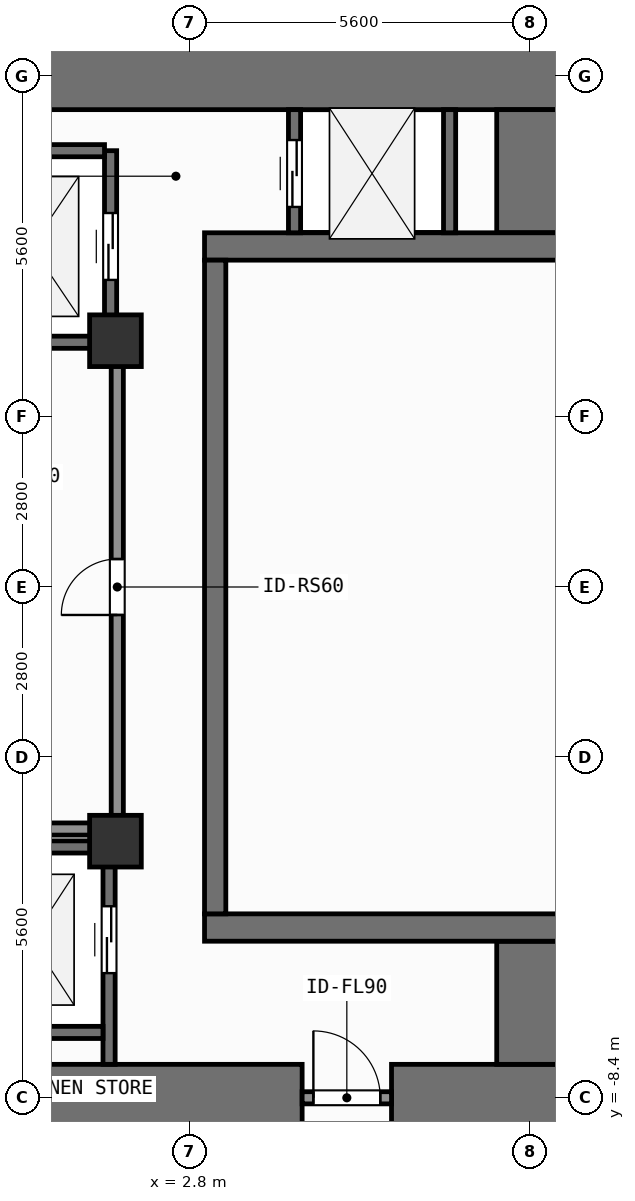
"""IFC4 building model, lengths in metres.
Left out: names, types, materials, properties, quantities, classifications, styles, units other than length and angle.
Written with IfcOpenShell. Run it as: python <this file> out.ifc"""

import sys

from ifc_helpers import new_model, si_unit, direction, frame, frame_2d, origin, origin_2d, place, context, subcontext, project, spatial, rectangle, extrude, element, fill, save


model = new_model("IFC4")
c1 = context("Model", 3, precision=1e-05, world=origin(), true_north=direction((0.0, 1.0)))
c2 = subcontext(c1, "Body", "Model", "MODEL_VIEW")
j1 = project(units=[si_unit("LENGTHUNIT", "METRE"), si_unit("PLANEANGLEUNIT", "RADIAN")], contexts=[c1])
p1 = place(None, origin())
s1 = spatial("IfcSite", under=j1, at=p1, CompositionType="ELEMENT")
p2 = place(p1, origin())
s2 = spatial("IfcBuilding", under=s1, at=p2, CompositionType="ELEMENT")
p3 = place(p2, frame((0.0, 0.0, 4.8)))
s3 = spatial("IfcBuildingStorey", under=s2, at=p3, CompositionType="ELEMENT", Elevation=4.8)
p4 = place(p3, frame((-2.62, -8.4, 0.0), z_axis=(0.0, 0.0, 1.0), x_axis=(1.0, 0.0, 0.0)))
e1 = element("IfcWall", 1, at=p4, inside=s3, PredefinedType="SHEAR", context=c2, shape_type="SweptSolid", body=[
    extrude(rectangle(XDim=7.27, YDim=1.1, at=frame_2d((3.635, 0.0))), origin(), (0.0, 0.0, 1.0), 4.2),
])
p5 = place(p3, frame((6.12, -8.4, 0.0), z_axis=(0.0, 0.0, 1.0), x_axis=(1.0, 0.0, 0.0)))
e2 = element("IfcWall", 2, at=p5, inside=s3, PredefinedType="SHEAR", context=c2, shape_type="SweptSolid", body=[
    extrude(rectangle(XDim=2.83, YDim=1.1, at=frame_2d((1.415, 0.0))), origin(), (0.0, 0.0, 1.0), 4.2),
])
p6 = place(p3, frame((-7.55, 8.4, 0.0), z_axis=(0.0, 0.0, 1.0), x_axis=(1.0, 0.0, 0.0)))
e3 = element("IfcWall", 3, at=p6, inside=s3, PredefinedType="SHEAR", context=c2, shape_type="SweptSolid", body=[
    extrude(rectangle(XDim=16.5, YDim=1.1, at=frame_2d((8.25, 0.0))), origin(), (0.0, 0.0, 1.0), 4.2),
])
for number, where, z_axis, x_axis in (
    (4, (8.4, -7.85, 0.0), (0.0, 0.0, 1.0), (0.0, 1.0, 0.0)),
    (5, (8.4, 5.825, 0.0), (0.0, 0.0, 1.0), (0.0, 1.0, 0.0)),
):
    element("IfcWall", number, at=place(p3, frame(where, z_axis=z_axis, x_axis=x_axis)), inside=s3, PredefinedType="SHEAR", context=c2, shape_type="SweptSolid", body=[
        extrude(rectangle(XDim=2.025, YDim=1.1, at=frame_2d((1.013, 0.0))), origin(), (0.0, 0.0, 1.0), 4.2),
    ])
for number, where, z_axis, x_axis in (
    (6, (3.045, -5.6, 0.0), (0.0, 0.0, 1.0), (1.0, 0.0, 0.0)),
    (7, (3.045, 5.6, 0.0), (0.0, 0.0, 1.0), (1.0, 0.0, 0.0)),
):
    element("IfcWall", number, at=place(p3, frame(where, z_axis=z_axis, x_axis=x_axis)), inside=s3, PredefinedType="SHEAR", context=c2, shape_type="SweptSolid", body=[
        extrude(rectangle(XDim=5.905, YDim=0.45, at=frame_2d((2.953, 0.0))), origin(), (0.0, 0.0, 1.0), 4.2),
    ])
p7 = place(p3, frame((3.22, -5.375, 0.0), z_axis=(0.0, 0.0, 1.0), x_axis=(0.0, 1.0, 0.0)))
e8 = element("IfcWall", 8, at=p7, inside=s3, PredefinedType="SHEAR", context=c2, shape_type="SweptSolid", body=[
    extrude(rectangle(XDim=10.75, YDim=0.35, at=frame_2d((5.375, 0.0))), origin(), (0.0, 0.0, 1.0), 4.2),
])
for number, where, z_axis, x_axis in (
    (9, (1.58, -4.18, 0.0), (0.0, 0.0, 1.0), (1.0, 0.0, 0.0)),
    (10, (1.58, 4.05, 0.0), (0.0, 0.0, 1.0), (1.0, 0.0, 0.0)),
):
    element("IfcColumn", number, at=place(p3, frame(where, z_axis=z_axis, x_axis=x_axis)), inside=s3, PredefinedType="COLUMN", context=c2, shape_type="SweptSolid", body=[
        extrude(rectangle(XDim=0.85, YDim=0.85, at=origin_2d()), origin(), (0.0, 0.0, 1.0), 4.2),
    ])
p8 = place(p3, frame((1.5, 4.025, 0.0), z_axis=(0.0, 0.0, 1.0), x_axis=(0.0, 1.0, 0.0)))
e11 = element("IfcWall", 11, at=p8, inside=s3, PredefinedType="SHEAR", context=c2, shape_type="SweptSolid", body=[
    extrude(rectangle(XDim=3.15, YDim=0.2, at=frame_2d((1.575, 0.0))), origin(), (0.0, 0.0, 1.0), 3.96),
])
p9 = place(p8, frame((1.025, 0.0, 0.0)))
e12 = element("IfcOpeningElement", 12, at=p9, cuts=e11, PredefinedType="OPENING", context=c2, shape_type="SweptSolid", body=[
    extrude(rectangle(XDim=1.1, YDim=2.2, at=frame_2d((0.55, 1.1))), frame((0.0, 0.11, 0.0), z_axis=(0.0, -1.0, 0.0), x_axis=(1.0, 0.0, 0.0)), (0.0, 0.0, 1.0), 0.22),
])
for number, where, z_axis, x_axis in (
    (13, (-1.0, 4.025, 0.0), (0.0, 0.0, 1.0), (1.0, 0.0, 0.0)),
    (14, (-1.0, 7.175, 0.0), (0.0, 0.0, 1.0), (1.0, 0.0, 0.0)),
):
    element("IfcWall", number, at=place(p3, frame(where, z_axis=z_axis, x_axis=x_axis)), inside=s3, PredefinedType="SHEAR", context=c2, shape_type="SweptSolid", body=[
        extrude(rectangle(XDim=2.4, YDim=0.2, at=frame_2d((1.2, 0.0))), origin(), (0.0, 0.0, 1.0), 3.96),
    ])
p10 = place(p3, frame((1.475, -7.85, 0.0), z_axis=(0.0, 0.0, 1.0), x_axis=(0.0, 1.0, 0.0)))
e15 = element("IfcWall", 15, at=p10, inside=s3, PredefinedType="SHEAR", context=c2, shape_type="SweptSolid", body=[
    extrude(rectangle(XDim=3.575, YDim=0.2, at=frame_2d((1.788, 0.0))), origin(), (0.0, 0.0, 1.0), 3.96),
])
p11 = place(p10, frame((1.5, 0.0, 0.0)))
e16 = element("IfcOpeningElement", 16, at=p11, cuts=e15, PredefinedType="OPENING", context=c2, shape_type="SweptSolid", body=[
    extrude(rectangle(XDim=1.1, YDim=2.2, at=frame_2d((0.55, 1.1))), frame((0.0, 0.11, 0.0), z_axis=(0.0, -1.0, 0.0), x_axis=(1.0, 0.0, 0.0)), (0.0, 0.0, 1.0), 0.22),
])
for number, where, z_axis, x_axis in (
    (17, (-0.975, -7.325, 0.0), (0.0, 0.0, 1.0), (1.0, 0.0, 0.0)),
    (18, (-0.975, -4.275, 0.0), (0.0, 0.0, 1.0), (1.0, 0.0, 0.0)),
):
    element("IfcWall", number, at=place(p3, frame(where, z_axis=z_axis, x_axis=x_axis)), inside=s3, PredefinedType="SHEAR", context=c2, shape_type="SweptSolid", body=[
        extrude(rectangle(XDim=2.35, YDim=0.2, at=frame_2d((1.175, 0.0))), origin(), (0.0, 0.0, 1.0), 3.96),
    ])
p12 = place(p3, frame((4.525, 5.825, 0.0), z_axis=(0.0, 0.0, 1.0), x_axis=(0.0, 1.0, 0.0)))
e19 = element("IfcWall", 19, at=p12, inside=s3, PredefinedType="SHEAR", context=c2, shape_type="SweptSolid", body=[
    extrude(rectangle(XDim=2.025, YDim=0.2, at=frame_2d((1.013, 0.0))), origin(), (0.0, 0.0, 1.0), 3.96),
])
p13 = place(p12, frame((0.425, 0.0, 0.0)))
e20 = element("IfcOpeningElement", 20, at=p13, cuts=e19, PredefinedType="OPENING", context=c2, shape_type="SweptSolid", body=[
    extrude(rectangle(XDim=1.1, YDim=2.2, at=frame_2d((0.55, 1.1))), frame((0.0, 0.11, 0.0), z_axis=(0.0, -1.0, 0.0), x_axis=(1.0, 0.0, 0.0)), (0.0, 0.0, 1.0), 0.22),
])
p14 = place(p3, frame((7.075, 5.825, 0.0), z_axis=(0.0, 0.0, 1.0), x_axis=(0.0, 1.0, 0.0)))
e21 = element("IfcWall", 21, at=p14, inside=s3, PredefinedType="SHEAR", context=c2, shape_type="SweptSolid", body=[
    extrude(rectangle(XDim=2.025, YDim=0.2, at=frame_2d((1.013, 0.0))), origin(), (0.0, 0.0, 1.0), 3.96),
])
p15 = place(p3, frame((4.65, -8.4, 0.0), z_axis=(0.0, 0.0, 1.0), x_axis=(1.0, 0.0, 0.0)))
e22 = element("IfcWall", 22, at=p15, inside=s3, PredefinedType="SOLIDWALL", context=c2, shape_type="SweptSolid", body=[
    extrude(rectangle(XDim=1.47, YDim=0.2, at=frame_2d((0.735, 0.0))), origin(), (0.0, 0.0, 1.0), 3.0),
])
p16 = place(p15, frame((0.185, 0.0, 0.0)))
e23 = element("IfcOpeningElement", 23, at=p16, cuts=e22, PredefinedType="OPENING", context=c2, shape_type="SweptSolid", body=[
    extrude(rectangle(XDim=1.1, YDim=2.15, at=frame_2d((0.55, 1.075))), frame((0.0, 0.11, 0.0), z_axis=(0.0, -1.0, 0.0), x_axis=(1.0, 0.0, 0.0)), (0.0, 0.0, 1.0), 0.22),
])
p17 = place(p3, frame((1.61, -3.98, 0.0), z_axis=(0.0, 0.0, 1.0), x_axis=(0.0, 1.0, 0.0)))
e24 = element("IfcWall", 24, at=p17, inside=s3, PredefinedType="SOLIDWALL", context=c2, shape_type="SweptSolid", body=[
    extrude(rectangle(XDim=7.96, YDim=0.2, at=frame_2d((3.98, 0.0))), origin(), (0.0, 0.0, 1.0), 3.96),
])
p18 = place(p17, frame((3.52, 0.0, 0.0)))
e25 = element("IfcOpeningElement", 25, at=p18, cuts=e24, PredefinedType="OPENING", context=c2, shape_type="SweptSolid", body=[
    extrude(rectangle(XDim=0.92, YDim=2.1, at=frame_2d((0.46, 1.05))), frame((0.0, 0.11, 0.0), z_axis=(0.0, -1.0, 0.0), x_axis=(1.0, 0.0, 0.0)), (0.0, 0.0, 1.0), 0.22),
])
p19 = place(p3, frame((-1.58, -3.98, 0.0), z_axis=(0.0, 0.0, 1.0), x_axis=(1.0, 0.0, 0.0)))
e26 = element("IfcWall", 26, at=p19, inside=s3, PredefinedType="SOLIDWALL", context=c2, shape_type="SweptSolid", body=[
    extrude(rectangle(XDim=3.19, YDim=0.2, at=frame_2d((1.595, 0.0))), origin(), (0.0, 0.0, 1.0), 3.96),
])
p20 = place(p9, origin())
e27 = element("IfcDoor", 27, at=p20, inside=s3, OperationType="SLIDING_TO_LEFT", PredefinedType="DOOR", context=c2, shape_type="SweptSolid", body=[
    extrude(rectangle(XDim=1.1, YDim=2.2, at=frame_2d((0.55, 1.1))), frame((0.0, 0.025, 0.0), z_axis=(0.0, -1.0, 0.0), x_axis=(1.0, 0.0, 0.0)), (0.0, 0.0, 1.0), 0.05),
])
fill(e12, e27)
p21 = place(p11, origin())
e28 = element("IfcDoor", 28, at=p21, inside=s3, OperationType="SLIDING_TO_LEFT", PredefinedType="DOOR", context=c2, shape_type="SweptSolid", body=[
    extrude(rectangle(XDim=1.1, YDim=2.2, at=frame_2d((0.55, 1.1))), frame((0.0, 0.025, 0.0), z_axis=(0.0, -1.0, 0.0), x_axis=(1.0, 0.0, 0.0)), (0.0, 0.0, 1.0), 0.05),
])
fill(e16, e28)
p22 = place(p13, origin())
e29 = element("IfcDoor", 29, at=p22, inside=s3, OperationType="SLIDING_TO_LEFT", PredefinedType="DOOR", context=c2, shape_type="SweptSolid", body=[
    extrude(rectangle(XDim=1.1, YDim=2.2, at=frame_2d((0.55, 1.1))), frame((0.0, 0.025, 0.0), z_axis=(0.0, -1.0, 0.0), x_axis=(1.0, 0.0, 0.0)), (0.0, 0.0, 1.0), 0.05),
])
fill(e20, e29)
p23 = place(p16, origin())
e30 = element("IfcDoor", 30, at=p23, inside=s3, OperationType="SINGLE_SWING_LEFT", PredefinedType="DOOR", context=c2, shape_type="SweptSolid", body=[
    extrude(rectangle(XDim=1.1, YDim=2.15, at=frame_2d((0.55, 1.075))), frame((0.0, 0.025, 0.0), z_axis=(0.0, -1.0, 0.0), x_axis=(1.0, 0.0, 0.0)), (0.0, 0.0, 1.0), 0.05),
])
fill(e23, e30)
p24 = place(p18, origin())
e31 = element("IfcDoor", 31, at=p24, inside=s3, OperationType="SINGLE_SWING_LEFT", PredefinedType="DOOR", context=c2, shape_type="SweptSolid", body=[
    extrude(rectangle(XDim=0.92, YDim=2.1, at=frame_2d((0.46, 1.05))), frame((0.0, 0.025, 0.0), z_axis=(0.0, -1.0, 0.0), x_axis=(1.0, 0.0, 0.0)), (0.0, 0.0, 1.0), 0.05),
])
fill(e25, e31)
save(model, sys.argv[1])
